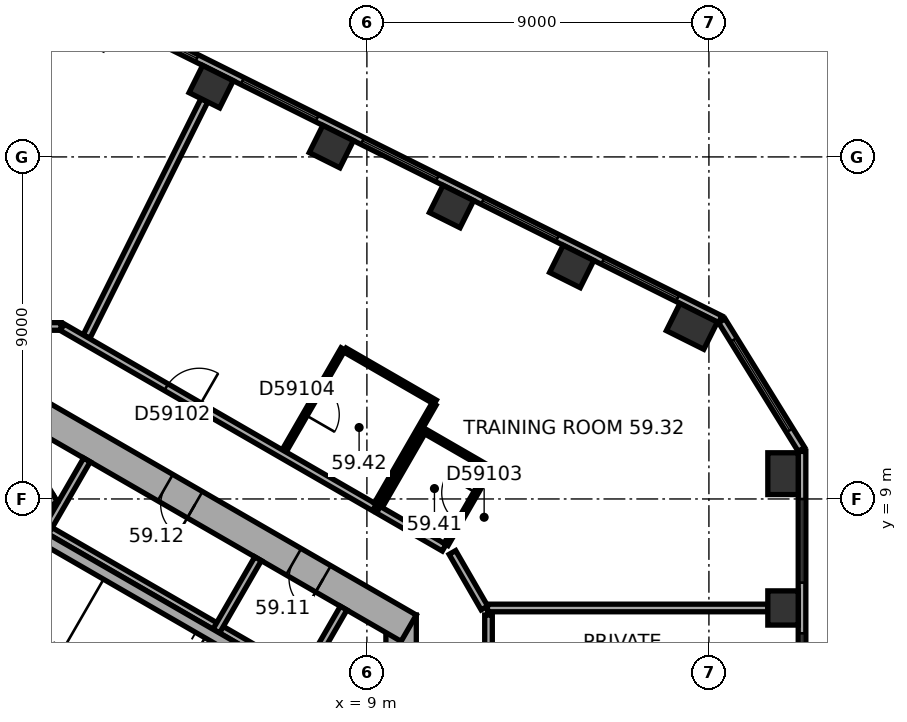
"""IFC4 building model, lengths in metres.
Left out: names, types, materials, properties, quantities, classifications, styles, units other than length and angle.
Written with IfcOpenShell. Run it as: python <this file> out.ifc"""

import sys

from ifc_helpers import new_model, si_unit, direction, frame, frame_2d, origin, origin_2d, place, context, subcontext, project, spatial, rectangle, extrude, element, fill, save


model = new_model("IFC4")
c1 = context("Model", 3, precision=1e-05, world=origin(), true_north=direction((0.0, 1.0)))
c2 = subcontext(c1, "Body", "Model", "MODEL_VIEW")
j1 = project(units=[si_unit("LENGTHUNIT", "METRE"), si_unit("PLANEANGLEUNIT", "RADIAN")], contexts=[c1])
p1 = place(None, origin())
s1 = spatial("IfcSite", under=j1, at=p1, CompositionType="ELEMENT")
p2 = place(p1, origin())
s2 = spatial("IfcBuilding", under=s1, at=p2, CompositionType="ELEMENT")
p3 = place(p2, frame((0.0, 0.0, 240.2)))
s3 = spatial("IfcBuildingStorey", under=s2, at=p3, CompositionType="ELEMENT", Elevation=240.2)
p4 = place(p3, frame((19.95, 6.132, 0.0), z_axis=(0.0, 0.0, 1.0), x_axis=(0.0, 1.0, 0.0)))
e1 = element("IfcColumn", 1, at=p4, inside=s3, PredefinedType="COLUMN", context=c2, shape_type="SweptSolid", body=[
    extrude(rectangle(XDim=0.9, YDim=0.8, at=origin_2d()), origin(), (0.0, 0.0, 1.0), 3.7),
])
for number, where, z_axis, x_axis in (
    (2, (19.95, 9.665, 0.0), (0.0, 0.0, 1.0), (0.0, 1.0, 0.0)),
    (3, (17.552, 13.541, 0.0), (0.0, 0.0, 1.0), (-0.895, 0.446, 0.0)),
):
    element("IfcColumn", number, at=place(p3, frame(where, z_axis=z_axis, x_axis=x_axis)), inside=s3, PredefinedType="COLUMN", context=c2, shape_type="SweptSolid", body=[
        extrude(rectangle(XDim=1.1, YDim=0.8, at=origin_2d()), origin(), (0.0, 0.0, 1.0), 3.7),
    ])
for number, where, z_axis, x_axis in (
    (4, (14.389, 15.118, 0.0), (0.0, 0.0, 1.0), (-0.895, 0.446, 0.0)),
    (5, (11.227, 16.695, 0.0), (0.0, 0.0, 1.0), (-0.895, 0.446, 0.0)),
    (6, (8.064, 18.271, 0.0), (0.0, 0.0, 1.0), (-0.895, 0.446, 0.0)),
    (7, (4.902, 19.848, 0.0), (0.0, 0.0, 1.0), (-0.895, 0.446, 0.0)),
):
    element("IfcColumn", number, at=place(p3, frame(where, z_axis=z_axis, x_axis=x_axis)), inside=s3, PredefinedType="COLUMN", context=c2, shape_type="SweptSolid", body=[
        extrude(rectangle(XDim=0.9, YDim=0.8, at=origin_2d()), origin(), (0.0, 0.0, 1.0), 3.7),
    ])
p5 = place(p3, frame((9.9, -5.947, 0.0), z_axis=(0.0, 0.0, 1.0), x_axis=(0.0, 1.0, 0.0)))
e8 = element("IfcWall", 8, at=p5, inside=s3, PredefinedType="SHEAR", context=c2, shape_type="SweptSolid", body=[
    extrude(rectangle(XDim=11.894, YDim=0.8, at=frame_2d((5.947, 0.0))), origin(), (0.0, 0.0, 1.0), 3.7),
])
p6 = place(p5, frame((6.147, 0.0, 0.0)))
e9 = element("IfcOpeningElement", 9, at=p6, cuts=e8, PredefinedType="OPENING", context=c2, shape_type="SweptSolid", body=[
    extrude(rectangle(XDim=1.5, YDim=2.1, at=frame_2d((0.75, 1.05))), frame((0.0, 0.41, 0.0), z_axis=(0.0, -1.0, 0.0), x_axis=(1.0, 0.0, 0.0)), (0.0, 0.0, 1.0), 0.82),
])
p7 = place(p5, frame((2.997, 0.0, 0.0)))
e10 = element("IfcOpeningElement", 10, at=p7, cuts=e8, PredefinedType="OPENING", context=c2, shape_type="SweptSolid", body=[
    extrude(rectangle(XDim=0.9, YDim=2.1, at=frame_2d((0.45, 1.05))), frame((0.0, 0.41, 0.0), z_axis=(0.0, -1.0, 0.0), x_axis=(1.0, 0.0, 0.0)), (0.0, 0.0, 1.0), 0.82),
])
p8 = place(p3, frame((10.1, 5.6, 0.0), z_axis=(0.0, 0.0, 1.0), x_axis=(-0.866023897231, 0.500002609418, 0.0)))
e11 = element("IfcWall", 11, at=p8, inside=s3, PredefinedType="SHEAR", context=c2, shape_type="SweptSolid", body=[
    extrude(rectangle(XDim=11.894, YDim=0.8, at=frame_2d((5.947, 0.0))), origin(), (0.0, 0.0, 1.0), 3.7),
])
p9 = place(p8, frame((2.597, 0.0, 0.0)))
e12 = element("IfcOpeningElement", 12, at=p9, cuts=e11, PredefinedType="OPENING", context=c2, shape_type="SweptSolid", body=[
    extrude(rectangle(XDim=0.9, YDim=2.1, at=frame_2d((0.45, 1.05))), frame((0.0, 0.41, 0.0), z_axis=(0.0, -1.0, 0.0), x_axis=(1.0, 0.0, 0.0)), (0.0, 0.0, 1.0), 0.82),
])
p10 = place(p8, frame((6.497, 0.0, 0.0)))
e13 = element("IfcOpeningElement", 13, at=p10, cuts=e11, PredefinedType="OPENING", context=c2, shape_type="SweptSolid", body=[
    extrude(rectangle(XDim=0.9, YDim=2.1, at=frame_2d((0.45, 1.05))), frame((0.0, 0.41, 0.0), z_axis=(0.0, -1.0, 0.0), x_axis=(1.0, 0.0, 0.0)), (0.0, 0.0, 1.0), 0.82),
])
p11 = place(p3, frame((20.45, -8.59, 0.0), z_axis=(0.0, 0.0, 1.0), x_axis=(0.0, 1.0, 0.0)))
e14 = element("IfcWall", 14, at=p11, inside=s3, PredefinedType="STANDARD", context=c2, shape_type="SweptSolid", body=[
    extrude(rectangle(XDim=18.841, YDim=0.2, at=frame_2d((9.421, 0.0))), origin(), (0.0, 0.0, 1.0), 3.7),
])
p12 = place(p11, frame((1.254, 0.0, 0.9)))
e15 = element("IfcOpeningElement", 15, at=p12, cuts=e14, PredefinedType="OPENING", context=c2, shape_type="SweptSolid", body=[
    extrude(rectangle(XDim=2.2, YDim=2.0, at=frame_2d((1.1, 1.0))), frame((0.0, 0.11, 0.0), z_axis=(0.0, -1.0, 0.0), x_axis=(1.0, 0.0, 0.0)), (0.0, 0.0, 1.0), 0.22),
])
p13 = place(p11, frame((4.788, 0.0, 0.9)))
e16 = element("IfcOpeningElement", 16, at=p13, cuts=e14, PredefinedType="OPENING", context=c2, shape_type="SweptSolid", body=[
    extrude(rectangle(XDim=2.2, YDim=2.0, at=frame_2d((1.1, 1.0))), frame((0.0, 0.11, 0.0), z_axis=(0.0, -1.0, 0.0), x_axis=(1.0, 0.0, 0.0)), (0.0, 0.0, 1.0), 0.22),
])
p14 = place(p11, frame((8.322, 0.0, 0.9)))
e17 = element("IfcOpeningElement", 17, at=p14, cuts=e14, PredefinedType="OPENING", context=c2, shape_type="SweptSolid", body=[
    extrude(rectangle(XDim=2.2, YDim=2.0, at=frame_2d((1.1, 1.0))), frame((0.0, 0.11, 0.0), z_axis=(0.0, -1.0, 0.0), x_axis=(1.0, 0.0, 0.0)), (0.0, 0.0, 1.0), 0.22),
])
p15 = place(p11, frame((11.855, 0.0, 0.9)))
e18 = element("IfcOpeningElement", 18, at=p15, cuts=e14, PredefinedType="OPENING", context=c2, shape_type="SweptSolid", body=[
    extrude(rectangle(XDim=2.2, YDim=2.0, at=frame_2d((1.1, 1.0))), frame((0.0, 0.11, 0.0), z_axis=(0.0, -1.0, 0.0), x_axis=(1.0, 0.0, 0.0)), (0.0, 0.0, 1.0), 0.22),
])
p16 = place(p11, frame((15.389, 0.0, 0.9)))
e19 = element("IfcOpeningElement", 19, at=p16, cuts=e14, PredefinedType="OPENING", context=c2, shape_type="SweptSolid", body=[
    extrude(rectangle(XDim=2.2, YDim=2.0, at=frame_2d((1.1, 1.0))), frame((0.0, 0.11, 0.0), z_axis=(0.0, -1.0, 0.0), x_axis=(1.0, 0.0, 0.0)), (0.0, 0.0, 1.0), 0.22),
])
p17 = place(p3, frame((20.435, 10.304, 0.0), z_axis=(0.0, 0.0, 1.0), x_axis=(-0.526202661606, 0.850359194058, 0.0)))
e20 = element("IfcWall", 20, at=p17, inside=s3, PredefinedType="STANDARD", context=c2, shape_type="SweptSolid", body=[
    extrude(rectangle(XDim=3.983, YDim=0.2, at=frame_2d((1.991, 0.0))), origin(), (0.0, 0.0, 1.0), 3.7),
])
p18 = place(p17, frame((0.591, 0.0, 0.9)))
e21 = element("IfcOpeningElement", 21, at=p18, cuts=e20, PredefinedType="OPENING", context=c2, shape_type="SweptSolid", body=[
    extrude(rectangle(XDim=2.8, YDim=2.0, at=frame_2d((1.4, 1.0))), frame((0.0, 0.11, 0.0), z_axis=(0.0, -1.0, 0.0), x_axis=(1.0, 0.0, 0.0)), (0.0, 0.0, 1.0), 0.22),
])
p19 = place(p3, frame((18.299, 13.727, 0.0), z_axis=(0.0, 0.0, 1.0), x_axis=(-0.894934554817, 0.44619742558, 0.0)))
e22 = element("IfcWall", 22, at=p19, inside=s3, PredefinedType="STANDARD", context=c2, shape_type="SweptSolid", body=[
    extrude(rectangle(XDim=18.841, YDim=0.2, at=frame_2d((9.421, 0.0))), origin(), (0.0, 0.0, 1.0), 3.7),
])
p20 = place(p19, frame((1.253, 0.0, 0.9)))
e23 = element("IfcOpeningElement", 23, at=p20, cuts=e22, PredefinedType="OPENING", context=c2, shape_type="SweptSolid", body=[
    extrude(rectangle(XDim=2.2, YDim=2.0, at=frame_2d((1.1, 1.0))), frame((0.0, 0.11, 0.0), z_axis=(0.0, -1.0, 0.0), x_axis=(1.0, 0.0, 0.0)), (0.0, 0.0, 1.0), 0.22),
])
p21 = place(p19, frame((4.786, 0.0, 0.9)))
e24 = element("IfcOpeningElement", 24, at=p21, cuts=e22, PredefinedType="OPENING", context=c2, shape_type="SweptSolid", body=[
    extrude(rectangle(XDim=2.2, YDim=2.0, at=frame_2d((1.1, 1.0))), frame((0.0, 0.11, 0.0), z_axis=(0.0, -1.0, 0.0), x_axis=(1.0, 0.0, 0.0)), (0.0, 0.0, 1.0), 0.22),
])
p22 = place(p19, frame((8.32, 0.0, 0.9)))
e25 = element("IfcOpeningElement", 25, at=p22, cuts=e22, PredefinedType="OPENING", context=c2, shape_type="SweptSolid", body=[
    extrude(rectangle(XDim=2.2, YDim=2.0, at=frame_2d((1.1, 1.0))), frame((0.0, 0.11, 0.0), z_axis=(0.0, -1.0, 0.0), x_axis=(1.0, 0.0, 0.0)), (0.0, 0.0, 1.0), 0.22),
])
p23 = place(p19, frame((11.854, 0.0, 0.9)))
e26 = element("IfcOpeningElement", 26, at=p23, cuts=e22, PredefinedType="OPENING", context=c2, shape_type="SweptSolid", body=[
    extrude(rectangle(XDim=2.2, YDim=2.0, at=frame_2d((1.1, 1.0))), frame((0.0, 0.11, 0.0), z_axis=(0.0, -1.0, 0.0), x_axis=(1.0, 0.0, 0.0)), (0.0, 0.0, 1.0), 0.22),
])
p24 = place(p19, frame((15.387, 0.0, 0.9)))
e27 = element("IfcOpeningElement", 27, at=p24, cuts=e22, PredefinedType="OPENING", context=c2, shape_type="SweptSolid", body=[
    extrude(rectangle(XDim=2.2, YDim=2.0, at=frame_2d((1.1, 1.0))), frame((0.0, 0.11, 0.0), z_axis=(0.0, -1.0, 0.0), x_axis=(1.0, 0.0, 0.0)), (0.0, 0.0, 1.0), 0.22),
])
p25 = place(p3, frame((7.424, 4.259, 0.0), z_axis=(0.0, 0.0, 1.0), x_axis=(-0.866026010844, 0.49999894854, 0.0)))
e28 = element("IfcWall", 28, at=p25, inside=s3, PredefinedType="PARTITIONING", context=c2, shape_type="SweptSolid", body=[
    extrude(rectangle(XDim=8.0, YDim=0.2, at=frame_2d((4.0, 0.0))), origin(), (0.0, 0.0, 1.0), 3.42),
])
for number, where, z_axis, x_axis in (
    (29, (7.287, 4.222, 0.0), (0.0, 0.0, 1.0), (0.5, 0.866, 0.0)),
    (30, (5.036, 5.522, 0.0), (0.0, 0.0, 1.0), (0.5, 0.866, 0.0)),
    (31, (0.532, 8.122, 0.0), (0.0, 0.0, 1.0), (0.5, 0.866, 0.0)),
):
    element("IfcWall", number, at=place(p3, frame(where, z_axis=z_axis, x_axis=x_axis)), inside=s3, PredefinedType="PARTITIONING", context=c2, shape_type="SweptSolid", body=[
        extrude(rectangle(XDim=2.2, YDim=0.2, at=frame_2d((1.1, 0.0))), origin(), (0.0, 0.0, 1.0), 3.42),
    ])
p26 = place(p3, frame((0.803, 9.009, 0.0), z_axis=(0.0, 0.0, 1.0), x_axis=(-0.866028230842, -0.499995103361, 0.0)))
e32 = element("IfcWall", 32, at=p26, inside=s3, PredefinedType="PARTITIONING", context=c2, shape_type="SweptSolid", body=[
    extrude(rectangle(XDim=5.4, YDim=0.2, at=frame_2d((2.7, 0.0))), origin(), (0.0, 0.0, 1.0), 3.42),
])
p27 = place(p3, frame((0.767, 8.872, 0.0), z_axis=(0.0, 0.0, 1.0), x_axis=(-0.499994660107, 0.866028486751, 0.0)))
e33 = element("IfcWall", 33, at=p27, inside=s3, PredefinedType="PARTITIONING", context=c2, shape_type="SweptSolid", body=[
    extrude(rectangle(XDim=2.2, YDim=0.2, at=frame_2d((1.1, 0.0))), origin(), (0.0, 0.0, 1.0), 3.42),
])
p28 = place(p3, frame((6.303, 4.617, 0.0), z_axis=(0.0, 0.0, 1.0), x_axis=(-0.866027801685, 0.499995846692, 0.0)))
e34 = element("IfcWall", 34, at=p28, inside=s3, PredefinedType="SHEAR", context=c2, shape_type="SweptSolid", body=[
    extrude(rectangle(XDim=7.06, YDim=0.3, at=frame_2d((3.53, 0.0))), origin(), (0.0, 0.0, 1.0), 3.42),
])
p29 = place(p3, frame((0.95, 13.539, 0.0), z_axis=(0.0, 0.0, 1.0), x_axis=(-1.0, 0.0, 0.0)))
e35 = element("IfcWall", 35, at=p29, inside=s3, PredefinedType="PARTITIONING", context=c2, shape_type="SweptSolid", body=[
    extrude(rectangle(XDim=1.9, YDim=0.2, at=frame_2d((0.95, 0.0))), origin(), (0.0, 0.0, 1.0), 3.42),
])
p30 = place(p3, frame((4.723, 19.49, 0.0), z_axis=(0.0, 0.0, 1.0), x_axis=(-0.446186614574, -0.894939944898, 0.0)))
e36 = element("IfcWall", 36, at=p30, inside=s3, PredefinedType="PARTITIONING", context=c2, shape_type="SweptSolid", body=[
    extrude(rectangle(XDim=6.944, YDim=0.2, at=frame_2d((3.472, 0.0))), origin(), (0.0, 0.0, 1.0), 2.87),
])
p31 = place(p3, frame((6.823, 10.264, 0.0), z_axis=(0.0, 0.0, 1.0), x_axis=(0.49999285859, 0.86602952684, 0.0)))
e37 = element("IfcWall", 37, at=p31, inside=s3, PredefinedType="PARTITIONING", context=c2, shape_type="SweptSolid", body=[
    extrude(rectangle(XDim=3.1, YDim=0.12, at=frame_2d((1.55, 0.0))), origin(), (0.0, 0.0, 1.0), 2.87),
])
p32 = place(p31, frame((1.1, 0.0, 0.0)))
e38 = element("IfcOpeningElement", 38, at=p32, cuts=e37, PredefinedType="OPENING", context=c2, shape_type="SweptSolid", body=[
    extrude(rectangle(XDim=0.9, YDim=2.1, at=frame_2d((0.45, 1.05))), frame((0.0, 0.07, 0.0), z_axis=(0.0, -1.0, 0.0), x_axis=(1.0, 0.0, 0.0)), (0.0, 0.0, 1.0), 0.14),
])
p33 = place(p3, frame((8.425, 12.918, 0.0), z_axis=(0.0, 0.0, 1.0), x_axis=(0.866019409031, -0.500010383074, 0.0)))
e39 = element("IfcWall", 39, at=p33, inside=s3, PredefinedType="PARTITIONING", context=c2, shape_type="SweptSolid", body=[
    extrude(rectangle(XDim=2.74, YDim=0.12, at=frame_2d((1.37, 0.0))), origin(), (0.0, 0.0, 1.0), 3.42),
])
p34 = place(p3, frame((9.198, 8.777, 0.0), z_axis=(0.0, 0.0, 1.0), x_axis=(-0.866026106692, 0.499998782526, 0.0)))
e40 = element("IfcWall", 40, at=p34, inside=s3, PredefinedType="PARTITIONING", context=c2, shape_type="SweptSolid", body=[
    extrude(rectangle(XDim=9.483, YDim=0.2, at=frame_2d((4.742, 0.0))), origin(), (0.0, 0.0, 1.0), 3.42),
])
p35 = place(p34, frame((5.325, 0.0, 0.0)))
e41 = element("IfcOpeningElement", 41, at=p35, cuts=e40, PredefinedType="OPENING", context=c2, shape_type="SweptSolid", body=[
    extrude(rectangle(XDim=1.0, YDim=2.1, at=frame_2d((0.5, 1.05))), frame((0.0, 0.11, 0.0), z_axis=(0.0, -1.0, 0.0), x_axis=(1.0, 0.0, 0.0)), (0.0, 0.0, 1.0), 0.22),
])
p36 = place(p3, frame((9.351, 8.804, 0.0), z_axis=(0.0, 0.0, 1.0), x_axis=(0.500031774688, 0.866007057882, 0.0)))
e42 = element("IfcWall", 42, at=p36, inside=s3, PredefinedType="PARTITIONING", context=c2, shape_type="SweptSolid", body=[
    extrude(rectangle(XDim=2.3, YDim=0.12, at=frame_2d((1.15, 0.0))), origin(), (0.0, 0.0, 1.0), 3.42),
])
p37 = place(p3, frame((10.553, 10.766, 0.0), z_axis=(0.0, 0.0, 1.0), x_axis=(0.866011626733, -0.500023861795, 0.0)))
e43 = element("IfcWall", 43, at=p37, inside=s3, PredefinedType="PARTITIONING", context=c2, shape_type="SweptSolid", body=[
    extrude(rectangle(XDim=1.94, YDim=0.12, at=frame_2d((0.97, 0.0))), origin(), (0.0, 0.0, 1.0), 3.42),
])
p38 = place(p3, frame((10.768, 11.496, 0.0), z_axis=(0.0, 0.0, 1.0), x_axis=(-0.500026023896, -0.86601037836, 0.0)))
e44 = element("IfcWall", 44, at=p38, inside=s3, PredefinedType="PARTITIONING", context=c2, shape_type="SweptSolid", body=[
    extrude(rectangle(XDim=3.04, YDim=0.12, at=frame_2d((1.52, 0.0))), origin(), (0.0, 0.0, 1.0), 3.42),
])
p39 = place(p3, frame((11.033, 7.717, 0.0), z_axis=(0.0, 0.0, 1.0), x_axis=(-0.866010750942, 0.50002537861, 0.0)))
e45 = element("IfcWall", 45, at=p39, inside=s3, PredefinedType="PARTITIONING", context=c2, shape_type="SweptSolid", body=[
    extrude(rectangle(XDim=2.0, YDim=0.2, at=frame_2d((1.0, 0.0))), origin(), (0.0, 0.0, 1.0), 3.42),
])
p40 = place(p3, frame((12.093, 6.132, 0.0), z_axis=(0.0, 0.0, 1.0), x_axis=(-0.500031561776, 0.866007180818, 0.0)))
e46 = element("IfcWall", 46, at=p40, inside=s3, PredefinedType="PARTITIONING", context=c2, shape_type="SweptSolid", body=[
    extrude(rectangle(XDim=1.687, YDim=0.2, at=frame_2d((0.843, 0.0))), origin(), (0.0, 0.0, 1.0), 3.42),
])
p41 = place(p3, frame((12.2, 2.598, 0.0), z_axis=(0.0, 0.0, 1.0), x_axis=(0.0, 1.0, 0.0)))
e47 = element("IfcWall", 47, at=p41, inside=s3, PredefinedType="PARTITIONING", context=c2, shape_type="SweptSolid", body=[
    extrude(rectangle(XDim=3.349, YDim=0.2, at=frame_2d((1.674, 0.0))), origin(), (0.0, 0.0, 1.0), 3.42),
])
p42 = place(p3, frame((12.204, 9.744, 0.0), z_axis=(0.0, 0.0, 1.0), x_axis=(-0.500030632641, -0.866007717299, 0.0)))
e48 = element("IfcWall", 48, at=p42, inside=s3, PredefinedType="PARTITIONING", context=c2, shape_type="SweptSolid", body=[
    extrude(rectangle(XDim=2.24, YDim=0.12, at=frame_2d((1.12, 0.0))), origin(), (0.0, 0.0, 1.0), 3.42),
])
p43 = place(p42, frame((0.67, 0.0, 0.0)))
e49 = element("IfcOpeningElement", 49, at=p43, cuts=e48, PredefinedType="OPENING", context=c2, shape_type="SweptSolid", body=[
    extrude(rectangle(XDim=0.9, YDim=2.1, at=frame_2d((0.45, 1.05))), frame((0.0, 0.07, 0.0), z_axis=(0.0, -1.0, 0.0), x_axis=(1.0, 0.0, 0.0)), (0.0, 0.0, 1.0), 0.14),
])
p44 = place(p3, frame((19.55, 6.132, 0.0), z_axis=(0.0, 0.0, 1.0), x_axis=(-1.0, 0.0, 0.0)))
e50 = element("IfcWall", 50, at=p44, inside=s3, PredefinedType="PARTITIONING", context=c2, shape_type="SweptSolid", body=[
    extrude(rectangle(XDim=7.377, YDim=0.2, at=frame_2d((3.688, 0.0))), origin(), (0.0, 0.0, 1.0), 3.42),
])
p45 = place(p15, origin())
e51 = element("IfcWindow", 51, at=p45, inside=s3, PartitioningType="SINGLE_PANEL", PredefinedType="WINDOW", context=c2, shape_type="SweptSolid", body=[
    extrude(rectangle(XDim=2.2, YDim=2.0, at=frame_2d((1.1, 1.0))), frame((0.0, 0.03, 0.0), z_axis=(0.0, -1.0, 0.0), x_axis=(1.0, 0.0, 0.0)), (0.0, 0.0, 1.0), 0.06),
])
fill(e18, e51)
p46 = place(p16, origin())
e52 = element("IfcWindow", 52, at=p46, inside=s3, PartitioningType="SINGLE_PANEL", PredefinedType="WINDOW", context=c2, shape_type="SweptSolid", body=[
    extrude(rectangle(XDim=2.2, YDim=2.0, at=frame_2d((1.1, 1.0))), frame((0.0, 0.03, 0.0), z_axis=(0.0, -1.0, 0.0), x_axis=(1.0, 0.0, 0.0)), (0.0, 0.0, 1.0), 0.06),
])
fill(e19, e52)
p47 = place(p18, origin())
e53 = element("IfcWindow", 53, at=p47, inside=s3, PartitioningType="SINGLE_PANEL", PredefinedType="WINDOW", context=c2, shape_type="SweptSolid", body=[
    extrude(rectangle(XDim=2.8, YDim=2.0, at=frame_2d((1.4, 1.0))), frame((0.0, 0.03, 0.0), z_axis=(0.0, -1.0, 0.0), x_axis=(1.0, 0.0, 0.0)), (0.0, 0.0, 1.0), 0.06),
])
fill(e21, e53)
p48 = place(p20, origin())
e54 = element("IfcWindow", 54, at=p48, inside=s3, PartitioningType="SINGLE_PANEL", PredefinedType="WINDOW", context=c2, shape_type="SweptSolid", body=[
    extrude(rectangle(XDim=2.2, YDim=2.0, at=frame_2d((1.1, 1.0))), frame((0.0, 0.03, 0.0), z_axis=(0.0, -1.0, 0.0), x_axis=(1.0, 0.0, 0.0)), (0.0, 0.0, 1.0), 0.06),
])
fill(e23, e54)
p49 = place(p21, origin())
e55 = element("IfcWindow", 55, at=p49, inside=s3, PartitioningType="SINGLE_PANEL", PredefinedType="WINDOW", context=c2, shape_type="SweptSolid", body=[
    extrude(rectangle(XDim=2.2, YDim=2.0, at=frame_2d((1.1, 1.0))), frame((0.0, 0.03, 0.0), z_axis=(0.0, -1.0, 0.0), x_axis=(1.0, 0.0, 0.0)), (0.0, 0.0, 1.0), 0.06),
])
fill(e24, e55)
p50 = place(p22, origin())
e56 = element("IfcWindow", 56, at=p50, inside=s3, PartitioningType="SINGLE_PANEL", PredefinedType="WINDOW", context=c2, shape_type="SweptSolid", body=[
    extrude(rectangle(XDim=2.2, YDim=2.0, at=frame_2d((1.1, 1.0))), frame((0.0, 0.03, 0.0), z_axis=(0.0, -1.0, 0.0), x_axis=(1.0, 0.0, 0.0)), (0.0, 0.0, 1.0), 0.06),
])
fill(e25, e56)
p51 = place(p23, origin())
e57 = element("IfcWindow", 57, at=p51, inside=s3, PartitioningType="SINGLE_PANEL", PredefinedType="WINDOW", context=c2, shape_type="SweptSolid", body=[
    extrude(rectangle(XDim=2.2, YDim=2.0, at=frame_2d((1.1, 1.0))), frame((0.0, 0.03, 0.0), z_axis=(0.0, -1.0, 0.0), x_axis=(1.0, 0.0, 0.0)), (0.0, 0.0, 1.0), 0.06),
])
fill(e26, e57)
p52 = place(p24, origin())
e58 = element("IfcWindow", 58, at=p52, inside=s3, PartitioningType="SINGLE_PANEL", PredefinedType="WINDOW", context=c2, shape_type="SweptSolid", body=[
    extrude(rectangle(XDim=2.2, YDim=2.0, at=frame_2d((1.1, 1.0))), frame((0.0, 0.03, 0.0), z_axis=(0.0, -1.0, 0.0), x_axis=(1.0, 0.0, 0.0)), (0.0, 0.0, 1.0), 0.06),
])
fill(e27, e58)
p53 = place(p9, origin())
e59 = element("IfcDoor", 59, at=p53, inside=s3, OperationType="SINGLE_SWING_LEFT", PredefinedType="DOOR", context=c2, shape_type="SweptSolid", body=[
    extrude(rectangle(XDim=0.9, YDim=2.1, at=frame_2d((0.45, 1.05))), frame((0.0, 0.025, 0.0), z_axis=(0.0, -1.0, 0.0), x_axis=(1.0, 0.0, 0.0)), (0.0, 0.0, 1.0), 0.05),
])
fill(e12, e59)
p54 = place(p10, origin())
e60 = element("IfcDoor", 60, at=p54, inside=s3, OperationType="SINGLE_SWING_LEFT", PredefinedType="DOOR", context=c2, shape_type="SweptSolid", body=[
    extrude(rectangle(XDim=0.9, YDim=2.1, at=frame_2d((0.45, 1.05))), frame((0.0, 0.025, 0.0), z_axis=(0.0, -1.0, 0.0), x_axis=(1.0, 0.0, 0.0)), (0.0, 0.0, 1.0), 0.05),
])
fill(e13, e60)
p55 = place(p35, origin())
e61 = element("IfcDoor", 61, at=p55, inside=s3, OperationType="SINGLE_SWING_LEFT", PredefinedType="DOOR", context=c2, shape_type="SweptSolid", body=[
    extrude(rectangle(XDim=1.0, YDim=2.1, at=frame_2d((0.5, 1.05))), frame((0.0, 0.025, 0.0), z_axis=(0.0, -1.0, 0.0), x_axis=(1.0, 0.0, 0.0)), (0.0, 0.0, 1.0), 0.05),
])
fill(e41, e61)
p56 = place(p43, origin())
e62 = element("IfcDoor", 62, at=p56, inside=s3, OperationType="SINGLE_SWING_LEFT", PredefinedType="DOOR", context=c2, shape_type="SweptSolid", body=[
    extrude(rectangle(XDim=0.9, YDim=2.1, at=frame_2d((0.45, 1.05))), frame((0.0, 0.025, 0.0), z_axis=(0.0, -1.0, 0.0), x_axis=(1.0, 0.0, 0.0)), (0.0, 0.0, 1.0), 0.05),
])
fill(e49, e62)
p57 = place(p32, origin())
e63 = element("IfcDoor", 63, at=p57, inside=s3, OperationType="SINGLE_SWING_LEFT", PredefinedType="DOOR", context=c2, shape_type="SweptSolid", body=[
    extrude(rectangle(XDim=0.9, YDim=2.1, at=frame_2d((0.45, 1.05))), frame((0.0, 0.025, 0.0), z_axis=(0.0, -1.0, 0.0), x_axis=(1.0, 0.0, 0.0)), (0.0, 0.0, 1.0), 0.05),
])
fill(e38, e63)
save(model, sys.argv[1])
